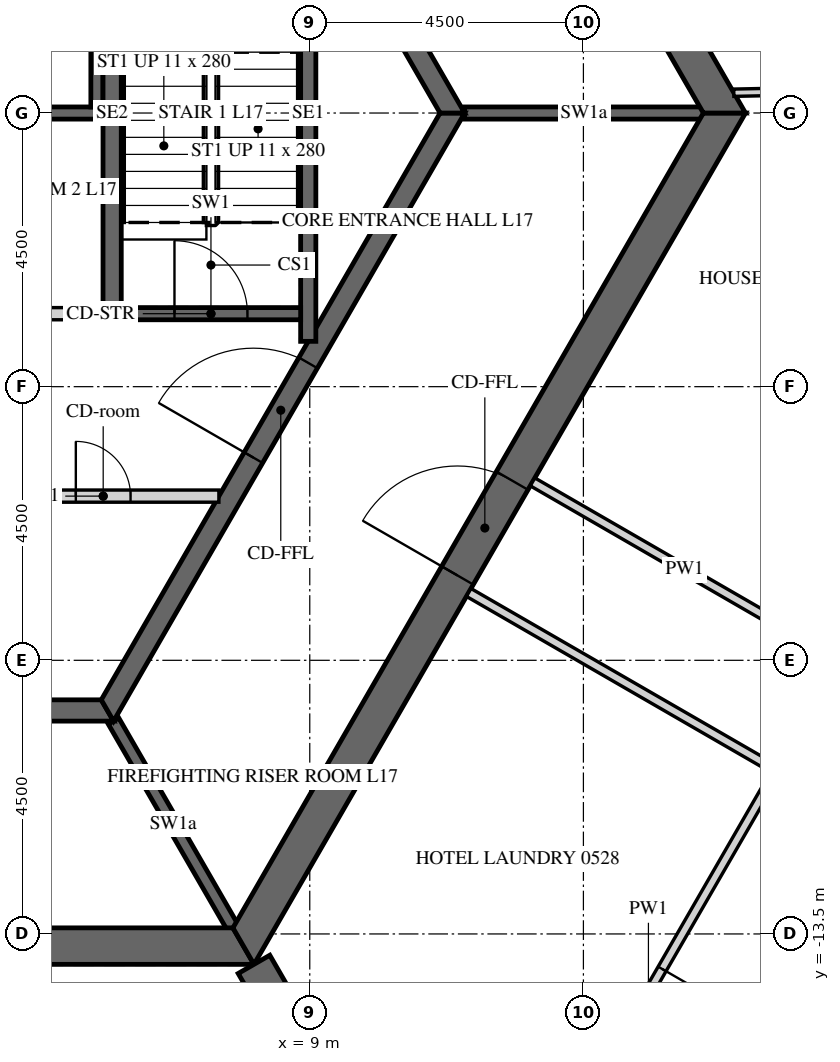
"""IFC4 building model, lengths in metres.
Left out: names, types, materials, properties, quantities, classifications, styles, units other than length and angle.
Written with IfcOpenShell. Run it as: python <this file> out.ifc"""

import sys

from ifc_helpers import new_model, si_unit, direction, frame, frame_2d, origin, place, context, subcontext, project, spatial, polyline, rectangle, outline, extrude, element, fill, save


model = new_model("IFC4")
c1 = context("Model", 3, precision=1e-05, world=origin(), true_north=direction((0.0, 1.0)))
c2 = subcontext(c1, "Body", "Model", "MODEL_VIEW")
j1 = project(units=[si_unit("LENGTHUNIT", "METRE"), si_unit("PLANEANGLEUNIT", "RADIAN")], contexts=[c1])
p1 = place(None, origin())
s1 = spatial("IfcSite", under=j1, at=p1, CompositionType="ELEMENT")
p2 = place(p1, origin())
s2 = spatial("IfcBuilding", under=s1, at=p2, CompositionType="ELEMENT")
p3 = place(p2, frame((0.0, 0.0, 80.4)))
s3 = spatial("IfcBuildingStorey", under=s2, at=p3, CompositionType="ELEMENT", Elevation=80.4)
p4 = place(p3, frame((-7.91, -13.7, -0.15), z_axis=(0.0, 0.0, 1.0), x_axis=(1.0, 0.0, 0.0)))
e1 = element("IfcWall", 1, at=p4, inside=s3, PredefinedType="SHEAR", context=c2, shape_type="SweptSolid", body=[
    extrude(outline(polyline([(-0.173, -0.3), (15.993, -0.3), (15.646, 0.3), (0.173, 0.3), (-0.173, -0.3)])), origin(), (0.0, 0.0, 1.0), 3.9),
])
p5 = place(p4, frame((7.31, 0.0, 0.15)))
e2 = element("IfcOpeningElement", 2, at=p5, cuts=e1, PredefinedType="OPENING", context=c2, shape_type="SweptSolid", body=[
    extrude(rectangle(XDim=1.2, YDim=2.4, at=frame_2d((0.6, 1.2))), frame((0.0, 0.31, 0.0), z_axis=(0.0, -1.0, 0.0), x_axis=(1.0, 0.0, 0.0)), (0.0, 0.0, 1.0), 0.62),
])
p6 = place(p3, frame((7.91, -13.7, -0.15), z_axis=(0.0, 0.0, 1.0), x_axis=(0.499999880136, 0.866025472988, 0.0)))
e3 = element("IfcWall", 3, at=p6, inside=s3, PredefinedType="SHEAR", context=c2, shape_type="SweptSolid", body=[
    extrude(outline(polyline([(-0.173, -0.3), (15.993, -0.3), (15.646, 0.3), (0.173, 0.3), (-0.173, -0.3)])), origin(), (0.0, 0.0, 1.0), 3.9),
])
p7 = place(p6, frame((7.039, 0.0, 0.15)))
e4 = element("IfcOpeningElement", 4, at=p7, cuts=e3, PredefinedType="OPENING", context=c2, shape_type="SweptSolid", body=[
    extrude(rectangle(XDim=1.8, YDim=2.4, at=frame_2d((0.9, 1.2))), frame((0.0, 0.31, 0.0), z_axis=(0.0, -1.0, 0.0), x_axis=(1.0, 0.0, 0.0)), (0.0, 0.0, 1.0), 0.62),
])
p8 = place(p3, frame((15.819, 0.0, -0.15), z_axis=(0.0, 0.0, 1.0), x_axis=(-0.499999880136, 0.866025472988, 0.0)))
e5 = element("IfcWall", 5, at=p8, inside=s3, PredefinedType="SHEAR", context=c2, shape_type="SweptSolid", body=[
    extrude(outline(polyline([(-0.173, -0.3), (15.993, -0.3), (15.646, 0.3), (0.173, 0.3), (-0.173, -0.3)])), origin(), (0.0, 0.0, 1.0), 3.9),
])
p9 = place(p8, frame((6.981, 0.0, 0.15)))
e6 = element("IfcOpeningElement", 6, at=p9, cuts=e5, PredefinedType="OPENING", context=c2, shape_type="SweptSolid", body=[
    extrude(rectangle(XDim=1.8, YDim=2.4, at=frame_2d((0.9, 1.2))), frame((0.0, 0.31, 0.0), z_axis=(0.0, -1.0, 0.0), x_axis=(1.0, 0.0, 0.0)), (0.0, 0.0, 1.0), 0.62),
])
p10 = place(p3, frame((8.083, -14.0, -0.15), z_axis=(0.0, 0.0, 1.0), x_axis=(0.499997680643, -0.866026742862, 0.0)))
e7 = element("IfcWall", 7, at=p10, inside=s3, PredefinedType="SHEAR", context=c2, shape_type="SweptSolid", body=[
    extrude(rectangle(XDim=16.509, YDim=0.6, at=frame_2d((8.254, 0.0))), origin(), (0.0, 0.0, 1.0), 3.9),
])
p11 = place(p10, frame((7.354, 0.0, 0.15)))
e8 = element("IfcOpeningElement", 8, at=p11, cuts=e7, PredefinedType="OPENING", context=c2, shape_type="SweptSolid", body=[
    extrude(rectangle(XDim=1.8, YDim=2.4, at=frame_2d((0.9, 1.2))), frame((0.0, 0.31, 0.0), z_axis=(0.0, -1.0, 0.0), x_axis=(1.0, 0.0, 0.0)), (0.0, 0.0, 1.0), 0.62),
])
p12 = place(p3, frame((-5.673, -9.825, -0.15), z_axis=(0.0, 0.0, 1.0), x_axis=(1.0, 0.0, 0.0)))
e9 = element("IfcWall", 9, at=p12, inside=s3, PredefinedType="SHEAR", context=c2, shape_type="SweptSolid", body=[
    extrude(outline(polyline([(-0.101, -0.175), (11.446, -0.175), (11.244, 0.175), (0.101, 0.175), (-0.101, -0.175)])), origin(), (0.0, 0.0, 1.0), 3.9),
])
p13 = place(p3, frame((5.673, -9.825, -0.15), z_axis=(0.0, 0.0, 1.0), x_axis=(0.499995046907, 0.866028263435, 0.0)))
e10 = element("IfcWall", 10, at=p13, inside=s3, PredefinedType="SHEAR", context=c2, shape_type="SweptSolid", body=[
    extrude(outline(polyline([(-0.101, -0.175), (11.446, -0.175), (11.244, 0.175), (0.101, 0.175), (-0.101, -0.175)])), origin(), (0.0, 0.0, 1.0), 3.9),
])
p14 = place(p13, frame((4.801, 0.0, 0.15)))
e11 = element("IfcOpeningElement", 11, at=p14, cuts=e10, PredefinedType="OPENING", context=c2, shape_type="SweptSolid", body=[
    extrude(rectangle(XDim=1.8, YDim=2.4, at=frame_2d((0.9, 1.2))), frame((0.0, 0.185, 0.0), z_axis=(0.0, -1.0, 0.0), x_axis=(1.0, 0.0, 0.0)), (0.0, 0.0, 1.0), 0.37),
])
p15 = place(p3, frame((11.345, 0.0, -0.15), z_axis=(0.0, 0.0, 1.0), x_axis=(-0.499995046907, 0.866028263435, 0.0)))
e12 = element("IfcWall", 12, at=p15, inside=s3, PredefinedType="SHEAR", context=c2, shape_type="SweptSolid", body=[
    extrude(outline(polyline([(-0.101, -0.175), (11.446, -0.175), (11.244, 0.175), (0.101, 0.175), (-0.101, -0.175)])), origin(), (0.0, 0.0, 1.0), 3.9),
])
p16 = place(p15, frame((4.744, 0.0, 0.15)))
e13 = element("IfcOpeningElement", 13, at=p16, cuts=e12, PredefinedType="OPENING", context=c2, shape_type="SweptSolid", body=[
    extrude(rectangle(XDim=1.8, YDim=2.4, at=frame_2d((0.9, 1.2))), frame((0.0, 0.185, 0.0), z_axis=(0.0, -1.0, 0.0), x_axis=(1.0, 0.0, 0.0)), (0.0, 0.0, 1.0), 0.37),
])
p17 = place(p3, frame((-5.6, 0.0, -0.25), z_axis=(0.0, 0.0, 1.0), x_axis=(1.0, 0.0, 0.0)))
e14 = element("IfcWall", 14, at=p17, inside=s3, PredefinedType="SHEAR", context=c2, shape_type="SweptSolid", body=[
    extrude(rectangle(XDim=11.2, YDim=0.2, at=frame_2d((5.6, 0.0))), origin(), (0.0, 0.0, 1.0), 3.9),
])
p18 = place(p3, frame((5.5, 0.1, -0.25), z_axis=(0.0, 0.0, 1.0), x_axis=(0.0, 1.0, 0.0)))
e15 = element("IfcWall", 15, at=p18, inside=s3, PredefinedType="SHEAR", context=c2, shape_type="SweptSolid", body=[
    extrude(rectangle(XDim=3.1, YDim=0.2, at=frame_2d((1.55, 0.0))), origin(), (0.0, 0.0, 1.0), 3.9),
])
p19 = place(p3, frame((0.1, -3.3, 0.0), z_axis=(0.0, 0.0, 1.0), x_axis=(1.0, 0.0, 0.0)))
e16 = element("IfcWall", 16, at=p19, inside=s3, PredefinedType="PARTITIONING", context=c2, shape_type="SweptSolid", body=[
    extrude(rectangle(XDim=5.5, YDim=0.2, at=frame_2d((2.75, 0.0))), origin(), (0.0, 0.0, 1.0), 3.65),
])
p20 = place(p19, frame((2.3, 0.0, 0.0)))
e17 = element("IfcOpeningElement", 17, at=p20, cuts=e16, PredefinedType="OPENING", context=c2, shape_type="SweptSolid", body=[
    extrude(rectangle(XDim=0.9, YDim=2.1, at=frame_2d((0.45, 1.05))), frame((0.0, 0.11, 0.0), z_axis=(0.0, -1.0, 0.0), x_axis=(1.0, 0.0, 0.0)), (0.0, 0.0, 1.0), 0.22),
])
p21 = place(p3, frame((3.7, -6.3, 0.0), z_axis=(0.0, 0.0, 1.0), x_axis=(1.0, 0.0, 0.0)))
e18 = element("IfcWall", 18, at=p21, inside=s3, PredefinedType="PARTITIONING", context=c2, shape_type="SweptSolid", body=[
    extrude(rectangle(XDim=3.806, YDim=0.2, at=frame_2d((1.903, 0.0))), origin(), (0.0, 0.0, 1.0), 3.65),
])
p22 = place(p21, frame((1.453, 0.0, 0.0)))
e19 = element("IfcOpeningElement", 19, at=p22, cuts=e18, PredefinedType="OPENING", context=c2, shape_type="SweptSolid", body=[
    extrude(rectangle(XDim=0.9, YDim=2.1, at=frame_2d((0.45, 1.05))), frame((0.0, 0.11, 0.0), z_axis=(0.0, -1.0, 0.0), x_axis=(1.0, 0.0, 0.0)), (0.0, 0.0, 1.0), 0.22),
])
p23 = place(p3, frame((11.547, 0.0, -0.15), z_axis=(0.0, 0.0, 1.0), x_axis=(1.0, 0.0, 0.0)))
e20 = element("IfcWall", 20, at=p23, inside=s3, PredefinedType="SHEAR", context=c2, shape_type="SweptSolid", body=[
    extrude(rectangle(XDim=3.926, YDim=0.2, at=frame_2d((1.963, 0.0))), origin(), (0.0, 0.0, 1.0), 3.9),
])
p24 = place(p3, frame((5.773, -10.0, -0.15), z_axis=(0.0, 0.0, 1.0), x_axis=(0.500038251005, -0.86600331843, 0.0)))
e21 = element("IfcWall", 21, at=p24, inside=s3, PredefinedType="SHEAR", context=c2, shape_type="SweptSolid", body=[
    extrude(rectangle(XDim=3.926, YDim=0.2, at=frame_2d((1.963, 0.0))), origin(), (0.0, 0.0, 1.0), 3.9),
])
p25 = place(p3, frame((5.75, -3.4, -0.25), z_axis=(0.0, 0.0, 1.0), x_axis=(0.0, 1.0, 0.0)))
e22 = element("IfcWall", 22, at=p25, inside=s3, PredefinedType="SHEAR", context=c2, shape_type="SweptSolid", body=[
    extrude(rectangle(XDim=6.8, YDim=0.3, at=frame_2d((3.4, 0.0))), origin(), (0.0, 0.0, 1.0), 3.9),
])
p26 = place(p3, frame((8.975, -3.755, -0.25), z_axis=(0.0, 0.0, 1.0), x_axis=(0.0, 1.0, 0.0)))
e23 = element("IfcWall", 23, at=p26, inside=s3, PredefinedType="SHEAR", context=c2, shape_type="SweptSolid", body=[
    extrude(rectangle(XDim=7.51, YDim=0.25, at=frame_2d((3.755, 0.0))), origin(), (0.0, 0.0, 1.0), 3.9),
])
p27 = place(p3, frame((5.9, -3.3, -0.25), z_axis=(0.0, 0.0, 1.0), x_axis=(1.0, 0.0, 0.0)))
e24 = element("IfcWall", 24, at=p27, inside=s3, PredefinedType="SHEAR", context=c2, shape_type="SweptSolid", body=[
    extrude(rectangle(XDim=2.95, YDim=0.2, at=frame_2d((1.475, 0.0))), origin(), (0.0, 0.0, 1.0), 3.9),
])
p28 = place(p27, frame((0.875, 0.0, 0.25)))
e25 = element("IfcOpeningElement", 25, at=p28, cuts=e24, PredefinedType="OPENING", context=c2, shape_type="SweptSolid", body=[
    extrude(rectangle(XDim=1.2, YDim=2.4, at=frame_2d((0.6, 1.2))), frame((0.0, 0.11, 0.0), z_axis=(0.0, -1.0, 0.0), x_axis=(1.0, 0.0, 0.0)), (0.0, 0.0, 1.0), 0.22),
])
p29 = place(p3, frame((13.755, -19.475, 0.0), z_axis=(0.0, 0.0, 1.0), x_axis=(0.50000013933, 0.866025323342, 0.0)))
e26 = element("IfcWall", 26, at=p29, inside=s3, PredefinedType="PARTITIONING", context=c2, shape_type="SweptSolid", body=[
    extrude(rectangle(XDim=23.517, YDim=0.15, at=frame_2d((11.758, 0.0))), origin(), (0.0, 0.0, 1.0), 2.988),
])
p30 = place(p29, frame((2.056, 0.0, 0.0)))
e27 = element("IfcOpeningElement", 27, at=p30, cuts=e26, PredefinedType="OPENING", context=c2, shape_type="SweptSolid", body=[
    extrude(rectangle(XDim=1.0, YDim=2.1, at=frame_2d((0.5, 1.05))), frame((0.0, 0.085, 0.0), z_axis=(0.0, -1.0, 0.0), x_axis=(1.0, 0.0, 0.0)), (0.0, 0.0, 1.0), 0.17),
])
p31 = place(p29, frame((15.499, 0.0, 0.0)))
e28 = element("IfcOpeningElement", 28, at=p31, cuts=e26, PredefinedType="OPENING", context=c2, shape_type="SweptSolid", body=[
    extrude(rectangle(XDim=1.0, YDim=2.1, at=frame_2d((0.5, 1.05))), frame((0.0, 0.085, 0.0), z_axis=(0.0, -1.0, 0.0), x_axis=(1.0, 0.0, 0.0)), (0.0, 0.0, 1.0), 0.17),
])
p32 = place(p3, frame((25.467, 0.96, 0.0), z_axis=(0.0, 0.0, 1.0), x_axis=(-0.559192112521, 0.829038106057, 0.0)))
e29 = element("IfcWall", 29, at=p32, inside=s3, PredefinedType="PARTITIONING", context=c2, shape_type="SweptSolid", body=[
    extrude(rectangle(XDim=21.584, YDim=0.15, at=frame_2d((10.792, 0.0))), origin(), (0.0, 0.0, 1.0), 2.988),
])
p33 = place(p32, frame((0.184, 0.0, 0.0)))
e30 = element("IfcOpeningElement", 30, at=p33, cuts=e29, PredefinedType="OPENING", context=c2, shape_type="SweptSolid", body=[
    extrude(rectangle(XDim=1.0, YDim=2.1, at=frame_2d((0.5, 1.05))), frame((0.0, 0.085, 0.0), z_axis=(0.0, -1.0, 0.0), x_axis=(1.0, 0.0, 0.0)), (0.0, 0.0, 1.0), 0.17),
])
p34 = place(p32, frame((9.434, 0.0, 0.0)))
e31 = element("IfcOpeningElement", 31, at=p34, cuts=e29, PredefinedType="OPENING", context=c2, shape_type="SweptSolid", body=[
    extrude(rectangle(XDim=1.0, YDim=2.1, at=frame_2d((0.5, 1.05))), frame((0.0, 0.085, 0.0), z_axis=(0.0, -1.0, 0.0), x_axis=(1.0, 0.0, 0.0)), (0.0, 0.0, 1.0), 0.17),
])
p35 = place(p32, frame((16.951, 0.0, 0.0)))
e32 = element("IfcOpeningElement", 32, at=p35, cuts=e29, PredefinedType="OPENING", context=c2, shape_type="SweptSolid", body=[
    extrude(rectangle(XDim=1.0, YDim=2.1, at=frame_2d((0.5, 1.05))), frame((0.0, 0.085, 0.0), z_axis=(0.0, -1.0, 0.0), x_axis=(1.0, 0.0, 0.0)), (0.0, 0.0, 1.0), 0.17),
])
p36 = place(p3, frame((17.665, -8.953, 0.0), z_axis=(0.0, 0.0, 1.0), x_axis=(-0.866025774745, 0.499999357477, 0.0)))
e33 = element("IfcWall", 33, at=p36, inside=s3, PredefinedType="PARTITIONING", context=c2, shape_type="SweptSolid", body=[
    extrude(rectangle(XDim=5.775, YDim=0.15, at=frame_2d((2.887, 0.0))), origin(), (0.0, 0.0, 1.0), 2.988),
])
p37 = place(p3, frame((11.614, -7.884, 0.0), z_axis=(0.0, 0.0, 1.0), x_axis=(0.866018092707, -0.500012662943, 0.0)))
e34 = element("IfcWall", 34, at=p37, inside=s3, PredefinedType="PARTITIONING", context=c2, shape_type="SweptSolid", body=[
    extrude(rectangle(XDim=5.85, YDim=0.15, at=frame_2d((2.925, 0.0))), origin(), (0.0, 0.0, 1.0), 2.988),
])
p38 = place(p3, frame((16.643, -10.874, 0.0), z_axis=(0.0, 0.0, 1.0), x_axis=(-0.50000192383, -0.866024293058, 0.0)))
e35 = element("IfcWall", 35, at=p38, inside=s3, PredefinedType="PARTITIONING", context=c2, shape_type="SweptSolid", body=[
    extrude(rectangle(XDim=8.293, YDim=0.15, at=frame_2d((4.146, 0.0))), origin(), (0.0, 0.0, 1.0), 2.988),
])
p39 = place(p38, frame((3.697, 0.0, 0.0)))
e36 = element("IfcOpeningElement", 36, at=p39, cuts=e35, PredefinedType="OPENING", context=c2, shape_type="SweptSolid", body=[
    extrude(rectangle(XDim=0.9, YDim=2.1, at=frame_2d((0.45, 1.05))), frame((0.0, 0.085, 0.0), z_axis=(0.0, -1.0, 0.0), x_axis=(1.0, 0.0, 0.0)), (0.0, 0.0, 1.0), 0.17),
])
p40 = place(p3, frame((23.113, 0.483, 0.0), z_axis=(0.0, 0.0, 1.0), x_axis=(-0.999781109464, -0.020922073482, 0.0)))
e37 = element("IfcWall", 37, at=p40, inside=s3, PredefinedType="PARTITIONING", context=c2, shape_type="SweptSolid", body=[
    extrude(rectangle(XDim=7.141, YDim=0.12, at=frame_2d((3.571, 0.0))), origin(), (0.0, 0.0, 1.0), 2.988),
])
p41 = place(p7, origin())
e38 = element("IfcDoor", 38, at=p41, inside=s3, OperationType="DOUBLE_DOOR_SINGLE_SWING", PredefinedType="DOOR", context=c2, shape_type="SweptSolid", body=[
    extrude(rectangle(XDim=1.8, YDim=2.4, at=frame_2d((0.9, 1.2))), frame((0.0, 0.025, 0.0), z_axis=(0.0, -1.0, 0.0), x_axis=(1.0, 0.0, 0.0)), (0.0, 0.0, 1.0), 0.05),
])
fill(e4, e38)
p42 = place(p14, origin())
e39 = element("IfcDoor", 39, at=p42, inside=s3, OperationType="DOUBLE_DOOR_SINGLE_SWING", PredefinedType="DOOR", context=c2, shape_type="SweptSolid", body=[
    extrude(rectangle(XDim=1.8, YDim=2.4, at=frame_2d((0.9, 1.2))), frame((0.0, 0.025, 0.0), z_axis=(0.0, -1.0, 0.0), x_axis=(1.0, 0.0, 0.0)), (0.0, 0.0, 1.0), 0.05),
])
fill(e11, e39)
p43 = place(p22, origin())
e40 = element("IfcDoor", 40, at=p43, inside=s3, OperationType="SINGLE_SWING_LEFT", PredefinedType="DOOR", context=c2, shape_type="SweptSolid", body=[
    extrude(rectangle(XDim=0.9, YDim=2.1, at=frame_2d((0.45, 1.05))), frame((0.0, 0.025, 0.0), z_axis=(0.0, -1.0, 0.0), x_axis=(1.0, 0.0, 0.0)), (0.0, 0.0, 1.0), 0.05),
])
fill(e19, e40)
p44 = place(p28, origin())
e41 = element("IfcDoor", 41, at=p44, inside=s3, OperationType="SINGLE_SWING_LEFT", PredefinedType="DOOR", context=c2, shape_type="SweptSolid", body=[
    extrude(rectangle(XDim=1.2, YDim=2.4, at=frame_2d((0.6, 1.2))), frame((0.0, 0.025, 0.0), z_axis=(0.0, -1.0, 0.0), x_axis=(1.0, 0.0, 0.0)), (0.0, 0.0, 1.0), 0.05),
])
fill(e25, e41)
p45 = place(p39, origin())
e42 = element("IfcDoor", 42, at=p45, inside=s3, OperationType="SINGLE_SWING_RIGHT", PredefinedType="DOOR", context=c2, shape_type="SweptSolid", body=[
    extrude(rectangle(XDim=0.9, YDim=2.1, at=frame_2d((0.45, 1.05))), frame((0.0, 0.025, 0.0), z_axis=(0.0, -1.0, 0.0), x_axis=(1.0, 0.0, 0.0)), (0.0, 0.0, 1.0), 0.05),
])
fill(e36, e42)
save(model, sys.argv[1])
